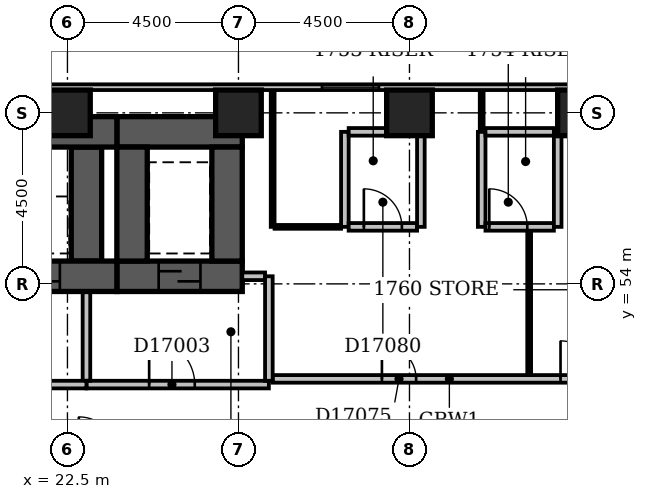
"""IFC4 building model, lengths in metres.
Left out: names, types, materials, properties, quantities, classifications, styles, units other than length and angle.
Written with IfcOpenShell. Run it as: python <this file> out.ifc"""

import sys

from ifc_helpers import new_model, si_unit, direction, frame, frame_2d, origin, origin_2d, place, context, subcontext, project, spatial, rectangle, extrude, element, fill, save


model = new_model("IFC4")
c1 = context("Model", 3, precision=1e-05, world=origin(), true_north=direction((0.0, 1.0)))
c2 = subcontext(c1, "Body", "Model", "MODEL_VIEW")
j1 = project(units=[si_unit("LENGTHUNIT", "METRE"), si_unit("PLANEANGLEUNIT", "RADIAN")], contexts=[c1])
p1 = place(None, origin())
s1 = spatial("IfcSite", under=j1, at=p1, CompositionType="ELEMENT")
p2 = place(p1, origin())
s2 = spatial("IfcBuilding", under=s1, at=p2, CompositionType="ELEMENT")
p3 = place(p2, frame((0.0, 0.0, 72.2)))
s3 = spatial("IfcBuildingStorey", under=s2, at=p3, CompositionType="ELEMENT", Elevation=72.2)
p4 = place(p3, frame((7.35, 54.2, -0.3), z_axis=(0.0, 0.0, 1.0), x_axis=(1.0, 0.0, 0.0)))
e1 = element("IfcWall", 1, at=p4, inside=s3, PredefinedType="SHEAR", context=c2, shape_type="SweptSolid", body=[
    extrude(rectangle(XDim=16.45, YDim=0.8, at=frame_2d((8.225, 0.0))), origin(), (0.0, 0.0, 1.0), 3.6),
])
p5 = place(p4, frame((1.35, 0.0, 0.3)))
e2 = element("IfcOpeningElement", 2, at=p5, cuts=e1, PredefinedType="OPENING", context=c2, shape_type="SweptSolid", body=[
    extrude(rectangle(XDim=1.1, YDim=2.1, at=frame_2d((0.55, 1.05))), frame((0.0, 0.412, 0.0), z_axis=(0.0, -1.0, 0.0), x_axis=(1.0, 0.0, 0.0)), (0.0, 0.0, 1.0), 0.824),
])
p6 = place(p4, frame((3.85, 0.0, 0.3)))
e3 = element("IfcOpeningElement", 3, at=p6, cuts=e1, PredefinedType="OPENING", context=c2, shape_type="SweptSolid", body=[
    extrude(rectangle(XDim=1.1, YDim=2.1, at=frame_2d((0.55, 1.05))), frame((0.0, 0.412, 0.0), z_axis=(0.0, -1.0, 0.0), x_axis=(1.0, 0.0, 0.0)), (0.0, 0.0, 1.0), 0.824),
])
p7 = place(p4, frame((6.35, 0.0, 0.3)))
e4 = element("IfcOpeningElement", 4, at=p7, cuts=e1, PredefinedType="OPENING", context=c2, shape_type="SweptSolid", body=[
    extrude(rectangle(XDim=1.1, YDim=2.1, at=frame_2d((0.55, 1.05))), frame((0.0, 0.412, 0.0), z_axis=(0.0, -1.0, 0.0), x_axis=(1.0, 0.0, 0.0)), (0.0, 0.0, 1.0), 0.824),
])
p8 = place(p4, frame((8.85, 0.0, 0.3)))
e5 = element("IfcOpeningElement", 5, at=p8, cuts=e1, PredefinedType="OPENING", context=c2, shape_type="SweptSolid", body=[
    extrude(rectangle(XDim=1.1, YDim=2.1, at=frame_2d((0.55, 1.05))), frame((0.0, 0.412, 0.0), z_axis=(0.0, -1.0, 0.0), x_axis=(1.0, 0.0, 0.0)), (0.0, 0.0, 1.0), 0.824),
])
p9 = place(p4, frame((11.35, 0.0, 0.3)))
e6 = element("IfcOpeningElement", 6, at=p9, cuts=e1, PredefinedType="OPENING", context=c2, shape_type="SweptSolid", body=[
    extrude(rectangle(XDim=1.1, YDim=2.1, at=frame_2d((0.55, 1.05))), frame((0.0, 0.412, 0.0), z_axis=(0.0, -1.0, 0.0), x_axis=(1.0, 0.0, 0.0)), (0.0, 0.0, 1.0), 0.824),
])
p10 = place(p4, frame((13.85, 0.0, 0.3)))
e7 = element("IfcOpeningElement", 7, at=p10, cuts=e1, PredefinedType="OPENING", context=c2, shape_type="SweptSolid", body=[
    extrude(rectangle(XDim=1.1, YDim=2.1, at=frame_2d((0.55, 1.05))), frame((0.0, 0.412, 0.0), z_axis=(0.0, -1.0, 0.0), x_axis=(1.0, 0.0, 0.0)), (0.0, 0.0, 1.0), 0.824),
])
p11 = place(p3, frame((7.35, 58.0, -0.3), z_axis=(0.0, 0.0, 1.0), x_axis=(1.0, 0.0, 0.0)))
e8 = element("IfcWall", 8, at=p11, inside=s3, PredefinedType="SHEAR", context=c2, shape_type="SweptSolid", body=[
    extrude(rectangle(XDim=16.45, YDim=0.8, at=frame_2d((8.225, 0.0))), origin(), (0.0, 0.0, 1.0), 3.6),
])
p12 = place(p3, frame((23.0, 54.6, -0.3), z_axis=(0.0, 0.0, 1.0), x_axis=(0.0, 1.0, 0.0)))
e9 = element("IfcWall", 9, at=p12, inside=s3, PredefinedType="SHEAR", context=c2, shape_type="SweptSolid", body=[
    extrude(rectangle(XDim=3.0, YDim=0.8, at=frame_2d((1.5, 0.0))), origin(), (0.0, 0.0, 1.0), 3.6),
])
p13 = place(p3, frame((23.8, 54.2, -0.3), z_axis=(0.0, 0.0, 1.0), x_axis=(1.0, 0.0, 0.0)))
e10 = element("IfcWall", 10, at=p13, inside=s3, PredefinedType="SHEAR", context=c2, shape_type="SweptSolid", body=[
    extrude(rectangle(XDim=3.3, YDim=0.8, at=frame_2d((1.65, 0.0))), origin(), (0.0, 0.0, 1.0), 3.6),
])
p14 = place(p13, frame((1.1, 0.0, 0.3)))
e11 = element("IfcOpeningElement", 11, at=p14, cuts=e10, PredefinedType="OPENING", context=c2, shape_type="SweptSolid", body=[
    extrude(rectangle(XDim=1.1, YDim=2.1, at=frame_2d((0.55, 1.05))), frame((0.0, 0.412, 0.0), z_axis=(0.0, -1.0, 0.0), x_axis=(1.0, 0.0, 0.0)), (0.0, 0.0, 1.0), 0.824),
])
p15 = place(p3, frame((23.8, 58.0, -0.3), z_axis=(0.0, 0.0, 1.0), x_axis=(1.0, 0.0, 0.0)))
e12 = element("IfcWall", 12, at=p15, inside=s3, PredefinedType="SHEAR", context=c2, shape_type="SweptSolid", body=[
    extrude(rectangle(XDim=3.3, YDim=0.8, at=frame_2d((1.65, 0.0))), origin(), (0.0, 0.0, 1.0), 3.6),
])
for number, where, z_axis, x_axis in (
    (13, (24.2, 54.6, -0.3), (0.0, 0.0, 1.0), (0.0, 1.0, 0.0)),
    (14, (26.7, 54.6, -0.3), (0.0, 0.0, 1.0), (0.0, 1.0, 0.0)),
):
    element("IfcWall", number, at=place(p3, frame(where, z_axis=z_axis, x_axis=x_axis)), inside=s3, PredefinedType="SHEAR", context=c2, shape_type="SweptSolid", body=[
        extrude(rectangle(XDim=3.0, YDim=0.8, at=frame_2d((1.5, 0.0))), origin(), (0.0, 0.0, 1.0), 3.6),
    ])
for number, where, z_axis, x_axis in (
    (15, (22.5, 58.5, -0.3), (0.0, 0.0, 1.0), (1.0, 0.0, 0.0)),
    (16, (27.0, 58.5, -0.3), (0.0, 0.0, 1.0), (1.0, 0.0, 0.0)),
    (17, (31.5, 58.5, -0.3), (0.0, 0.0, 1.0), (1.0, 0.0, 0.0)),
    (18, (36.0, 58.5, -0.3), (0.0, 0.0, 1.0), (1.0, 0.0, 0.0)),
):
    element("IfcColumn", number, at=place(p3, frame(where, z_axis=z_axis, x_axis=x_axis)), inside=s3, PredefinedType="COLUMN", context=c2, shape_type="SweptSolid", body=[
        extrude(rectangle(XDim=1.2, YDim=1.2, at=origin_2d()), origin(), (0.0, 0.0, 1.0), 3.6),
    ])
p16 = place(p3, frame((68.1, 59.175, 0.0), z_axis=(0.0, 0.0, 1.0), x_axis=(-1.0, 0.0, 0.0)))
e19 = element("IfcWall", 19, at=p16, inside=s3, PredefinedType="STANDARD", context=c2, shape_type="SweptSolid", body=[
    extrude(rectangle(XDim=68.85, YDim=0.15, at=frame_2d((34.425, 0.0))), origin(), (0.0, 0.0, 1.0), 2.7),
])
p17 = place(p16, frame((1.65, 0.0, 0.6)))
e20 = element("IfcOpeningElement", 20, at=p17, cuts=e19, PredefinedType="OPENING", context=c2, shape_type="SweptSolid", body=[
    extrude(rectangle(XDim=2.4, YDim=1.8, at=frame_2d((1.2, 0.9))), frame((0.0, 0.087, 0.0), z_axis=(0.0, -1.0, 0.0), x_axis=(1.0, 0.0, 0.0)), (0.0, 0.0, 1.0), 0.174),
])
p18 = place(p16, frame((6.15, 0.0, 0.6)))
e21 = element("IfcOpeningElement", 21, at=p18, cuts=e19, PredefinedType="OPENING", context=c2, shape_type="SweptSolid", body=[
    extrude(rectangle(XDim=2.4, YDim=1.8, at=frame_2d((1.2, 0.9))), frame((0.0, 0.087, 0.0), z_axis=(0.0, -1.0, 0.0), x_axis=(1.0, 0.0, 0.0)), (0.0, 0.0, 1.0), 0.174),
])
p19 = place(p16, frame((37.403, 0.0, 0.6)))
e22 = element("IfcOpeningElement", 22, at=p19, cuts=e19, PredefinedType="OPENING", context=c2, shape_type="SweptSolid", body=[
    extrude(rectangle(XDim=1.5, YDim=1.8, at=frame_2d((0.75, 0.9))), frame((0.0, 0.087, 0.0), z_axis=(0.0, -1.0, 0.0), x_axis=(1.0, 0.0, 0.0)), (0.0, 0.0, 1.0), 0.174),
])
p20 = place(p3, frame((8.0, 51.35, 0.0), z_axis=(0.0, 0.0, 1.0), x_axis=(1.0, 0.0, 0.0)))
e23 = element("IfcWall", 23, at=p20, inside=s3, PredefinedType="PARTITIONING", context=c2, shape_type="SweptSolid", body=[
    extrude(rectangle(XDim=15.0, YDim=0.2, at=frame_2d((7.5, 0.0))), origin(), (0.0, 0.0, 1.0), 3.3),
])
p21 = place(p20, frame((3.4, 0.0, 0.0)))
e24 = element("IfcOpeningElement", 24, at=p21, cuts=e23, PredefinedType="OPENING", context=c2, shape_type="SweptSolid", body=[
    extrude(rectangle(XDim=1.2, YDim=2.1, at=frame_2d((0.6, 1.05))), frame((0.0, 0.112, 0.0), z_axis=(0.0, -1.0, 0.0), x_axis=(1.0, 0.0, 0.0)), (0.0, 0.0, 1.0), 0.224),
])
p22 = place(p20, frame((9.4, 0.0, 0.0)))
e25 = element("IfcOpeningElement", 25, at=p22, cuts=e23, PredefinedType="OPENING", context=c2, shape_type="SweptSolid", body=[
    extrude(rectangle(XDim=1.2, YDim=2.1, at=frame_2d((0.6, 1.05))), frame((0.0, 0.112, 0.0), z_axis=(0.0, -1.0, 0.0), x_axis=(1.0, 0.0, 0.0)), (0.0, 0.0, 1.0), 0.224),
])
p23 = place(p3, frame((23.0, 51.45, 0.0), z_axis=(0.0, 0.0, 1.0), x_axis=(0.0, 1.0, 0.0)))
e26 = element("IfcWall", 26, at=p23, inside=s3, PredefinedType="PARTITIONING", context=c2, shape_type="SweptSolid", body=[
    extrude(rectangle(XDim=2.33, YDim=0.2, at=frame_2d((1.165, 0.0))), origin(), (0.0, 0.0, 1.0), 3.3),
])
p24 = place(p3, frame((23.0, 51.35, 0.0), z_axis=(0.0, 0.0, 1.0), x_axis=(1.0, 0.0, 0.0)))
e27 = element("IfcWall", 27, at=p24, inside=s3, PredefinedType="PARTITIONING", context=c2, shape_type="SweptSolid", body=[
    extrude(rectangle(XDim=4.8, YDim=0.2, at=frame_2d((2.4, 0.0))), origin(), (0.0, 0.0, 1.0), 3.3),
])
p25 = place(p24, frame((1.65, 0.0, 0.0)))
e28 = element("IfcOpeningElement", 28, at=p25, cuts=e27, PredefinedType="OPENING", context=c2, shape_type="SweptSolid", body=[
    extrude(rectangle(XDim=1.2, YDim=2.1, at=frame_2d((0.6, 1.05))), frame((0.0, 0.112, 0.0), z_axis=(0.0, -1.0, 0.0), x_axis=(1.0, 0.0, 0.0)), (0.0, 0.0, 1.0), 0.224),
])
p26 = place(p3, frame((27.8, 51.45, 0.0), z_axis=(0.0, 0.0, 1.0), x_axis=(0.0, 1.0, 0.0)))
e29 = element("IfcWall", 29, at=p26, inside=s3, PredefinedType="PARTITIONING", context=c2, shape_type="SweptSolid", body=[
    extrude(rectangle(XDim=2.75, YDim=0.2, at=frame_2d((1.375, 0.0))), origin(), (0.0, 0.0, 1.0), 3.3),
])
p27 = place(p3, frame((27.1, 54.2, 0.0), z_axis=(0.0, 0.0, 1.0), x_axis=(1.0, 0.0, 0.0)))
e30 = element("IfcWall", 30, at=p27, inside=s3, PredefinedType="PARTITIONING", context=c2, shape_type="SweptSolid", body=[
    extrude(rectangle(XDim=0.6, YDim=0.2, at=frame_2d((0.3, 0.0))), origin(), (0.0, 0.0, 1.0), 3.3),
])
p28 = place(p3, frame((27.9, 51.5, 0.0), z_axis=(0.0, 0.0, 1.0), x_axis=(1.0, 0.0, 0.0)))
e31 = element("IfcWall", 31, at=p28, inside=s3, PredefinedType="PARTITIONING", context=c2, shape_type="SweptSolid", body=[
    extrude(rectangle(XDim=9.3, YDim=0.2, at=frame_2d((4.65, 0.0))), origin(), (0.0, 0.0, 1.0), 3.3),
])
p29 = place(p28, frame((2.875, 0.0, 0.0)))
e32 = element("IfcOpeningElement", 32, at=p29, cuts=e31, PredefinedType="OPENING", context=c2, shape_type="SweptSolid", body=[
    extrude(rectangle(XDim=0.9, YDim=2.1, at=frame_2d((0.45, 1.05))), frame((0.0, 0.112, 0.0), z_axis=(0.0, -1.0, 0.0), x_axis=(1.0, 0.0, 0.0)), (0.0, 0.0, 1.0), 0.224),
])
p30 = place(p28, frame((7.575, 0.0, 0.0)))
e33 = element("IfcOpeningElement", 33, at=p30, cuts=e31, PredefinedType="OPENING", context=c2, shape_type="SweptSolid", body=[
    extrude(rectangle(XDim=1.0, YDim=2.1, at=frame_2d((0.5, 1.05))), frame((0.0, 0.112, 0.0), z_axis=(0.0, -1.0, 0.0), x_axis=(1.0, 0.0, 0.0)), (0.0, 0.0, 1.0), 0.224),
])
p31 = place(p3, frame((34.65, 51.6, 0.0), z_axis=(0.0, 0.0, 1.0), x_axis=(0.0, 1.0, 0.0)))
e34 = element("IfcWall", 34, at=p31, inside=s3, PredefinedType="PARTITIONING", context=c2, shape_type="SweptSolid", body=[
    extrude(rectangle(XDim=3.8, YDim=0.1, at=frame_2d((1.9, 0.0))), origin(), (0.0, 0.0, 1.0), 3.3),
])
p32 = place(p3, frame((27.9, 55.5, 0.0), z_axis=(0.0, 0.0, 1.0), x_axis=(0.0, 1.0, 0.0)))
e35 = element("IfcWall", 35, at=p32, inside=s3, PredefinedType="PARTITIONING", context=c2, shape_type="SweptSolid", body=[
    extrude(rectangle(XDim=3.6, YDim=0.1, at=frame_2d((1.8, 0.0))), origin(), (0.0, 0.0, 1.0), 3.3),
])
p33 = place(p3, frame((27.95, 55.5, 0.0), z_axis=(0.0, 0.0, 1.0), x_axis=(1.0, 0.0, 0.0)))
e36 = element("IfcWall", 36, at=p33, inside=s3, PredefinedType="PARTITIONING", context=c2, shape_type="SweptSolid", body=[
    extrude(rectangle(XDim=1.75, YDim=0.1, at=frame_2d((0.875, 0.0))), origin(), (0.0, 0.0, 1.0), 3.3),
])
p34 = place(p3, frame((29.8, 55.5, 0.0), z_axis=(0.0, 0.0, 1.0), x_axis=(0.0, 1.0, 0.0)))
e37 = element("IfcWall", 37, at=p34, inside=s3, PredefinedType="PARTITIONING", context=c2, shape_type="SweptSolid", body=[
    extrude(rectangle(XDim=2.5, YDim=0.2, at=frame_2d((1.25, 0.0))), origin(), (0.0, 0.0, 1.0), 3.3),
])
p35 = place(p3, frame((29.9, 55.5, 0.0), z_axis=(0.0, 0.0, 1.0), x_axis=(1.0, 0.0, 0.0)))
e38 = element("IfcWall", 38, at=p35, inside=s3, PredefinedType="PARTITIONING", context=c2, shape_type="SweptSolid", body=[
    extrude(rectangle(XDim=1.8, YDim=0.2, at=frame_2d((0.9, 0.0))), origin(), (0.0, 0.0, 1.0), 3.3),
])
p36 = place(p35, frame((0.4, 0.0, 0.0)))
e39 = element("IfcOpeningElement", 39, at=p36, cuts=e38, PredefinedType="OPENING", context=c2, shape_type="SweptSolid", body=[
    extrude(rectangle(XDim=1.0, YDim=2.1, at=frame_2d((0.5, 1.05))), frame((0.0, 0.112, 0.0), z_axis=(0.0, -1.0, 0.0), x_axis=(1.0, 0.0, 0.0)), (0.0, 0.0, 1.0), 0.224),
])
for number, where, z_axis, x_axis in (
    (40, (31.8, 55.5, 0.0), (0.0, 0.0, 1.0), (0.0, 1.0, 0.0)),
    (41, (33.4, 55.5, 0.0), (0.0, 0.0, 1.0), (0.0, 1.0, 0.0)),
):
    element("IfcWall", number, at=place(p3, frame(where, z_axis=z_axis, x_axis=x_axis)), inside=s3, PredefinedType="PARTITIONING", context=c2, shape_type="SweptSolid", body=[
        extrude(rectangle(XDim=2.5, YDim=0.2, at=frame_2d((1.25, 0.0))), origin(), (0.0, 0.0, 1.0), 3.3),
    ])
p37 = place(p3, frame((33.5, 55.5, 0.0), z_axis=(0.0, 0.0, 1.0), x_axis=(1.0, 0.0, 0.0)))
e42 = element("IfcWall", 42, at=p37, inside=s3, PredefinedType="PARTITIONING", context=c2, shape_type="SweptSolid", body=[
    extrude(rectangle(XDim=1.8, YDim=0.2, at=frame_2d((0.9, 0.0))), origin(), (0.0, 0.0, 1.0), 3.3),
])
p38 = place(p37, frame((0.1, 0.0, 0.0)))
e43 = element("IfcOpeningElement", 43, at=p38, cuts=e42, PredefinedType="OPENING", context=c2, shape_type="SweptSolid", body=[
    extrude(rectangle(XDim=1.0, YDim=2.1, at=frame_2d((0.5, 1.05))), frame((0.0, 0.112, 0.0), z_axis=(0.0, -1.0, 0.0), x_axis=(1.0, 0.0, 0.0)), (0.0, 0.0, 1.0), 0.224),
])
p39 = place(p3, frame((35.4, 55.5, 0.0), z_axis=(0.0, 0.0, 1.0), x_axis=(0.0, 1.0, 0.0)))
e44 = element("IfcWall", 44, at=p39, inside=s3, PredefinedType="PARTITIONING", context=c2, shape_type="SweptSolid", body=[
    extrude(rectangle(XDim=2.5, YDim=0.2, at=frame_2d((1.25, 0.0))), origin(), (0.0, 0.0, 1.0), 2.4),
])
p40 = place(p3, frame((29.9, 58.0, 0.0), z_axis=(0.0, 0.0, 1.0), x_axis=(1.0, 0.0, 0.0)))
e45 = element("IfcWall", 45, at=p40, inside=s3, PredefinedType="PARTITIONING", context=c2, shape_type="SweptSolid", body=[
    extrude(rectangle(XDim=1.8, YDim=0.2, at=frame_2d((0.9, 0.0))), origin(), (0.0, 0.0, 1.0), 3.3),
])
p41 = place(p3, frame((33.4, 58.0, 0.0), z_axis=(0.0, 0.0, 1.0), x_axis=(0.0, 1.0, 0.0)))
e46 = element("IfcWall", 46, at=p41, inside=s3, PredefinedType="PARTITIONING", context=c2, shape_type="SweptSolid", body=[
    extrude(rectangle(XDim=1.1, YDim=0.1, at=frame_2d((0.55, 0.0))), origin(), (0.0, 0.0, 1.0), 3.3),
])
p42 = place(p3, frame((33.5, 58.0, 0.0), z_axis=(0.0, 0.0, 1.0), x_axis=(1.0, 0.0, 0.0)))
e47 = element("IfcWall", 47, at=p42, inside=s3, PredefinedType="PARTITIONING", context=c2, shape_type="SweptSolid", body=[
    extrude(rectangle(XDim=1.8, YDim=0.2, at=frame_2d((0.9, 0.0))), origin(), (0.0, 0.0, 1.0), 3.3),
])
p43 = place(p19, origin())
e48 = element("IfcWindow", 48, at=p43, inside=s3, PartitioningType="SINGLE_PANEL", PredefinedType="WINDOW", context=c2, shape_type="SweptSolid", body=[
    extrude(rectangle(XDim=1.5, YDim=1.8, at=frame_2d((0.75, 0.9))), frame((0.0, 0.03, 0.0), z_axis=(0.0, -1.0, 0.0), x_axis=(1.0, 0.0, 0.0)), (0.0, 0.0, 1.0), 0.06),
])
fill(e22, e48)
p44 = place(p25, origin())
e49 = element("IfcDoor", 49, at=p44, inside=s3, OperationType="SINGLE_SWING_LEFT", PredefinedType="DOOR", context=c2, shape_type="SweptSolid", body=[
    extrude(rectangle(XDim=1.2, YDim=2.1, at=frame_2d((0.6, 1.05))), frame((0.0, 0.025, 0.0), z_axis=(0.0, -1.0, 0.0), x_axis=(1.0, 0.0, 0.0)), (0.0, 0.0, 1.0), 0.05),
])
fill(e28, e49)
p45 = place(p14, origin())
e50 = element("IfcDoor", 50, at=p45, inside=s3, OperationType="SLIDING_TO_LEFT", PredefinedType="DOOR", context=c2, shape_type="SweptSolid", body=[
    extrude(rectangle(XDim=1.1, YDim=2.1, at=frame_2d((0.55, 1.05))), frame((0.0, 0.025, 0.0), z_axis=(0.0, -1.0, 0.0), x_axis=(1.0, 0.0, 0.0)), (0.0, 0.0, 1.0), 0.05),
])
fill(e11, e50)
p46 = place(p10, origin())
e51 = element("IfcDoor", 51, at=p46, inside=s3, OperationType="SLIDING_TO_LEFT", PredefinedType="DOOR", context=c2, shape_type="SweptSolid", body=[
    extrude(rectangle(XDim=1.1, YDim=2.1, at=frame_2d((0.55, 1.05))), frame((0.0, 0.025, 0.0), z_axis=(0.0, -1.0, 0.0), x_axis=(1.0, 0.0, 0.0)), (0.0, 0.0, 1.0), 0.05),
])
fill(e7, e51)
p47 = place(p29, origin())
e52 = element("IfcDoor", 52, at=p47, inside=s3, OperationType="SINGLE_SWING_LEFT", PredefinedType="DOOR", context=c2, shape_type="SweptSolid", body=[
    extrude(rectangle(XDim=0.9, YDim=2.1, at=frame_2d((0.45, 1.05))), frame((0.0, 0.025, 0.0), z_axis=(0.0, -1.0, 0.0), x_axis=(1.0, 0.0, 0.0)), (0.0, 0.0, 1.0), 0.05),
])
fill(e32, e52)
p48 = place(p30, origin())
e53 = element("IfcDoor", 53, at=p48, inside=s3, OperationType="SINGLE_SWING_LEFT", PredefinedType="DOOR", context=c2, shape_type="SweptSolid", body=[
    extrude(rectangle(XDim=1.0, YDim=2.1, at=frame_2d((0.5, 1.05))), frame((0.0, 0.025, 0.0), z_axis=(0.0, -1.0, 0.0), x_axis=(1.0, 0.0, 0.0)), (0.0, 0.0, 1.0), 0.05),
])
fill(e33, e53)
p49 = place(p36, origin())
e54 = element("IfcDoor", 54, at=p49, inside=s3, OperationType="SINGLE_SWING_LEFT", PredefinedType="DOOR", context=c2, shape_type="SweptSolid", body=[
    extrude(rectangle(XDim=1.0, YDim=2.1, at=frame_2d((0.5, 1.05))), frame((0.0, 0.025, 0.0), z_axis=(0.0, -1.0, 0.0), x_axis=(1.0, 0.0, 0.0)), (0.0, 0.0, 1.0), 0.05),
])
fill(e39, e54)
p50 = place(p38, origin())
e55 = element("IfcDoor", 55, at=p50, inside=s3, OperationType="SINGLE_SWING_LEFT", PredefinedType="DOOR", context=c2, shape_type="SweptSolid", body=[
    extrude(rectangle(XDim=1.0, YDim=2.1, at=frame_2d((0.5, 1.05))), frame((0.0, 0.025, 0.0), z_axis=(0.0, -1.0, 0.0), x_axis=(1.0, 0.0, 0.0)), (0.0, 0.0, 1.0), 0.05),
])
fill(e43, e55)
save(model, sys.argv[1])
